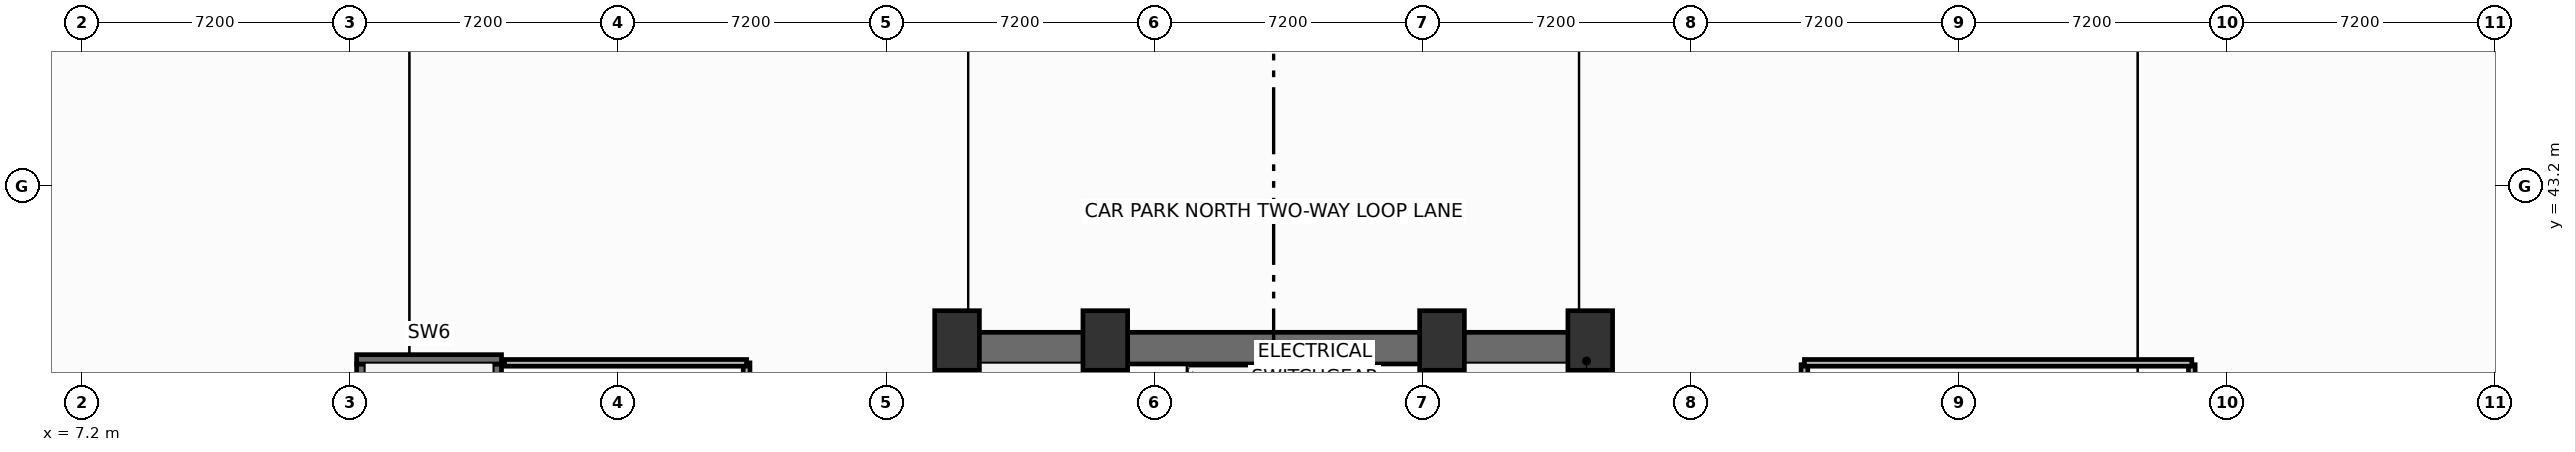
"""IFC4 building model, lengths in metres.
Left out: names, types, materials, properties, quantities, classifications, styles, units other than length and angle.
Written with IfcOpenShell. Run it as: python <this file> out.ifc"""

import sys

from ifc_helpers import new_model, si_unit, direction, frame, frame_2d, origin, origin_2d, place, context, subcontext, project, spatial, rectangle, extrude, element, save


model = new_model("IFC4")
c1 = context("Model", 3, precision=1e-05, world=origin(), true_north=direction((0.0, 1.0)))
c2 = subcontext(c1, "Body", "Model", "MODEL_VIEW")
j1 = project(units=[si_unit("LENGTHUNIT", "METRE"), si_unit("PLANEANGLEUNIT", "RADIAN")], contexts=[c1])
p1 = place(None, origin())
s1 = spatial("IfcSite", under=j1, at=p1, CompositionType="ELEMENT")
p2 = place(p1, origin())
s2 = spatial("IfcBuilding", under=s1, at=p2, CompositionType="ELEMENT")
p3 = place(p2, frame((0.0, 0.0, -9.0)))
s3 = spatial("IfcBuildingStorey", under=s2, at=p3, CompositionType="ELEMENT", Elevation=-9.0)
for number, where, z_axis, x_axis in (
    (1, (30.7, 39.05, 0.0), (0.0, 0.0, 1.0), (1.0, 0.0, 0.0)),
    (2, (34.68, 39.05, 0.0), (0.0, 0.0, 1.0), (1.0, 0.0, 0.0)),
    (3, (43.72, 39.05, 0.0), (0.0, 0.0, 1.0), (1.0, 0.0, 0.0)),
    (4, (47.7, 39.05, 0.0), (0.0, 0.0, 1.0), (1.0, 0.0, 0.0)),
):
    element("IfcColumn", number, at=place(p3, frame(where, z_axis=z_axis, x_axis=x_axis)), inside=s3, PredefinedType="COLUMN", context=c2, shape_type="SweptSolid", body=[
        extrude(rectangle(XDim=1.2, YDim=1.6, at=origin_2d()), origin(), (0.0, 0.0, 1.0), 4.5),
    ])
p4 = place(p3, frame((30.28, 38.845, 0.0), z_axis=(0.0, 0.0, 1.0), x_axis=(1.0, 0.0, 0.0)))
e5 = element("IfcWall", 5, at=p4, inside=s3, PredefinedType="SHEAR", context=c2, shape_type="SweptSolid", body=[
    extrude(rectangle(XDim=17.84, YDim=0.85, at=frame_2d((8.92, 0.0))), origin(), (0.0, 0.0, 1.0), 4.2),
])
for number, where, z_axis, x_axis in (
    (6, (30.705, 29.2, 0.0), (0.0, 0.0, 1.0), (0.0, 1.0, 0.0)),
    (7, (47.695, 29.2, 0.0), (0.0, 0.0, 1.0), (0.0, 1.0, 0.0)),
):
    element("IfcWall", number, at=place(p3, frame(where, z_axis=z_axis, x_axis=x_axis)), inside=s3, PredefinedType="SHEAR", context=c2, shape_type="SweptSolid", body=[
        extrude(rectangle(XDim=9.22, YDim=0.85, at=frame_2d((4.61, 0.0))), origin(), (0.0, 0.0, 1.0), 4.2),
    ])
p5 = place(p3, frame((34.64, 29.2, 0.0), z_axis=(0.0, 0.0, 1.0), x_axis=(0.0, 1.0, 0.0)))
e8 = element("IfcWall", 8, at=p5, inside=s3, PredefinedType="SHEAR", context=c2, shape_type="SweptSolid", body=[
    extrude(rectangle(XDim=9.22, YDim=0.25, at=frame_2d((4.61, 0.0))), origin(), (0.0, 0.0, 1.0), 4.2),
])
p6 = place(p5, frame((0.65, 0.0, 0.0)))
e9 = element("IfcOpeningElement", 9, at=p6, cuts=e8, PredefinedType="OPENING", context=c2, shape_type="SweptSolid", body=[
    extrude(rectangle(XDim=1.05, YDim=2.15, at=frame_2d((0.525, 1.075))), frame((0.0, 0.135, 0.0), z_axis=(0.0, -1.0, 0.0), x_axis=(1.0, 0.0, 0.0)), (0.0, 0.0, 1.0), 0.27),
])
p7 = place(p3, frame((43.76, 29.2, 0.0), z_axis=(0.0, 0.0, 1.0), x_axis=(0.0, 1.0, 0.0)))
e10 = element("IfcWall", 10, at=p7, inside=s3, PredefinedType="SHEAR", context=c2, shape_type="SweptSolid", body=[
    extrude(rectangle(XDim=9.22, YDim=0.25, at=frame_2d((4.61, 0.0))), origin(), (0.0, 0.0, 1.0), 4.2),
])
p8 = place(p7, frame((0.65, 0.0, 0.0)))
e11 = element("IfcOpeningElement", 11, at=p8, cuts=e10, PredefinedType="OPENING", context=c2, shape_type="SweptSolid", body=[
    extrude(rectangle(XDim=1.05, YDim=2.15, at=frame_2d((0.525, 1.075))), frame((0.0, 0.135, 0.0), z_axis=(0.0, -1.0, 0.0), x_axis=(1.0, 0.0, 0.0)), (0.0, 0.0, 1.0), 0.27),
])
p9 = place(p3, frame((14.705, 29.2, 0.0), z_axis=(0.0, 0.0, 1.0), x_axis=(0.0, 1.0, 0.0)))
e12 = element("IfcWall", 12, at=p9, inside=s3, PredefinedType="SHEAR", context=c2, shape_type="SweptSolid", body=[
    extrude(rectangle(XDim=9.22, YDim=0.25, at=frame_2d((4.61, 0.0))), origin(), (0.0, 0.0, 1.0), 4.2),
])
p10 = place(p3, frame((18.345, 29.2, 0.0), z_axis=(0.0, 0.0, 1.0), x_axis=(0.0, 1.0, 0.0)))
e13 = element("IfcWall", 13, at=p10, inside=s3, PredefinedType="SHEAR", context=c2, shape_type="SweptSolid", body=[
    extrude(rectangle(XDim=9.22, YDim=0.25, at=frame_2d((4.61, 0.0))), origin(), (0.0, 0.0, 1.0), 4.2),
])
p11 = place(p10, frame((0.65, 0.0, 0.0)))
e14 = element("IfcOpeningElement", 14, at=p11, cuts=e13, PredefinedType="OPENING", context=c2, shape_type="SweptSolid", body=[
    extrude(rectangle(XDim=1.05, YDim=2.15, at=frame_2d((0.525, 1.075))), frame((0.0, 0.135, 0.0), z_axis=(0.0, -1.0, 0.0), x_axis=(1.0, 0.0, 0.0)), (0.0, 0.0, 1.0), 0.27),
])
p12 = place(p3, frame((14.58, 38.545, 0.0), z_axis=(0.0, 0.0, 1.0), x_axis=(1.0, 0.0, 0.0)))
e15 = element("IfcWall", 15, at=p12, inside=s3, PredefinedType="SHEAR", context=c2, shape_type="SweptSolid", body=[
    extrude(rectangle(XDim=3.89, YDim=0.25, at=frame_2d((1.945, 0.0))), origin(), (0.0, 0.0, 1.0), 4.2),
])
p13 = place(p3, frame((25.05, 29.02, 0.0), z_axis=(0.0, 0.0, 1.0), x_axis=(0.0, 1.0, 0.0)))
e16 = element("IfcWall", 16, at=p13, inside=s3, PredefinedType="PARTITIONING", context=c2, shape_type="SweptSolid", body=[
    extrude(rectangle(XDim=9.43, YDim=0.18, at=frame_2d((4.715, 0.0))), origin(), (0.0, 0.0, 1.0), 4.2),
])
p14 = place(p3, frame((18.55, 38.45, 0.0), z_axis=(0.0, 0.0, 1.0), x_axis=(1.0, 0.0, 0.0)))
e17 = element("IfcWall", 17, at=p14, inside=s3, PredefinedType="PARTITIONING", context=c2, shape_type="SweptSolid", body=[
    extrude(rectangle(XDim=6.5, YDim=0.18, at=frame_2d((3.25, 0.0))), origin(), (0.0, 0.0, 1.0), 4.2),
])
p15 = place(p3, frame((63.85, 13.4, 0.0), z_axis=(0.0, 0.0, 1.0), x_axis=(0.0, 1.0, 0.0)))
e18 = element("IfcWall", 18, at=p15, inside=s3, PredefinedType="PARTITIONING", context=c2, shape_type="SweptSolid", body=[
    extrude(rectangle(XDim=25.0, YDim=0.18, at=frame_2d((12.5, 0.0))), origin(), (0.0, 0.0, 1.0), 4.2),
])
p16 = place(p15, frame((10.0, 0.0, 0.0)))
e19 = element("IfcOpeningElement", 19, at=p16, cuts=e18, PredefinedType="OPENING", context=c2, shape_type="SweptSolid", body=[
    extrude(rectangle(XDim=1.6, YDim=2.05, at=frame_2d((0.8, 1.025))), frame((0.0, 0.1, 0.0), z_axis=(0.0, -1.0, 0.0), x_axis=(1.0, 0.0, 0.0)), (0.0, 0.0, 1.0), 0.2),
])
p17 = place(p3, frame((53.45, 13.4, 0.0), z_axis=(0.0, 0.0, 1.0), x_axis=(0.0, 1.0, 0.0)))
e20 = element("IfcWall", 20, at=p17, inside=s3, PredefinedType="PARTITIONING", context=c2, shape_type="SweptSolid", body=[
    extrude(rectangle(XDim=25.0, YDim=0.18, at=frame_2d((12.5, 0.0))), origin(), (0.0, 0.0, 1.0), 4.2),
])
p18 = place(p3, frame((53.45, 38.45, 0.0), z_axis=(0.0, 0.0, 1.0), x_axis=(1.0, 0.0, 0.0)))
e21 = element("IfcWall", 21, at=p18, inside=s3, PredefinedType="PARTITIONING", context=c2, shape_type="SweptSolid", body=[
    extrude(rectangle(XDim=10.4, YDim=0.18, at=frame_2d((5.2, 0.0))), origin(), (0.0, 0.0, 1.0), 3.165),
])
for number, where, z_axis, x_axis in (
    (22, (37.0, 34.44, 0.0), (0.0, 0.0, 1.0), (0.0, 1.0, 0.0)),
    (23, (41.4, 34.44, 0.0), (0.0, 0.0, 1.0), (0.0, 1.0, 0.0)),
):
    element("IfcWall", number, at=place(p3, frame(where, z_axis=z_axis, x_axis=x_axis)), inside=s3, PredefinedType="PARTITIONING", context=c2, shape_type="SweptSolid", body=[
        extrude(rectangle(XDim=3.9, YDim=0.2, at=frame_2d((1.95, 0.0))), origin(), (0.0, 0.0, 1.0), 4.2),
    ])
p19 = place(p3, frame((39.22, 35.75, 0.0), z_axis=(0.0, 0.0, 1.0), x_axis=(0.0, 1.0, 0.0)))
e24 = element("IfcWall", 24, at=p19, inside=s3, PredefinedType="PARTITIONING", context=c2, shape_type="SweptSolid", body=[
    extrude(rectangle(XDim=2.59, YDim=0.2, at=frame_2d((1.295, 0.0))), origin(), (0.0, 0.0, 1.0), 4.2),
])
save(model, sys.argv[1])
